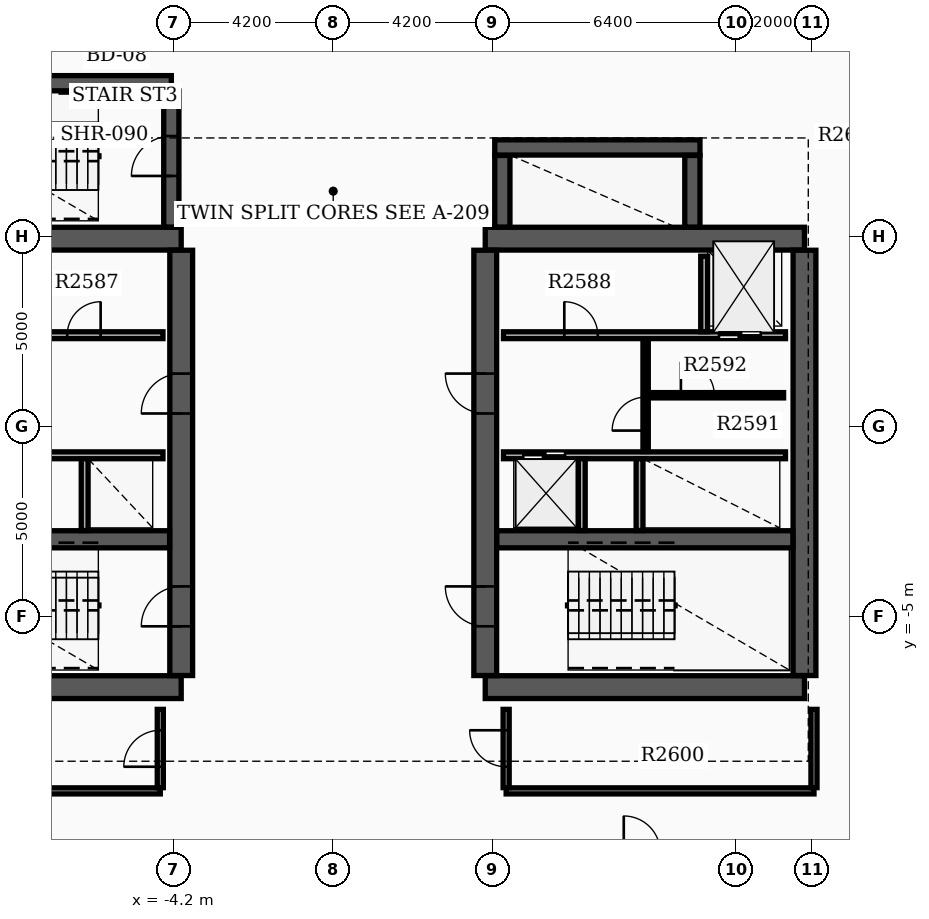
"""IFC4 building model, lengths in metres.
Left out: names, types, materials, properties, quantities, classifications, styles, units other than length and angle.
Written with IfcOpenShell. Run it as: python <this file> out.ifc"""

import sys

from ifc_helpers import new_model, si_unit, direction, frame, frame_2d, origin, place, context, subcontext, project, spatial, rectangle, extrude, element, fill, save


model = new_model("IFC4")
c1 = context("Model", 3, precision=1e-05, world=origin(), true_north=direction((0.0, 1.0)))
c2 = subcontext(c1, "Body", "Model", "MODEL_VIEW")
j1 = project(units=[si_unit("LENGTHUNIT", "METRE"), si_unit("PLANEANGLEUNIT", "RADIAN")], contexts=[c1])
p1 = place(None, origin())
s1 = spatial("IfcSite", under=j1, at=p1, CompositionType="ELEMENT")
p2 = place(p1, origin())
s2 = spatial("IfcBuilding", under=s1, at=p2, CompositionType="ELEMENT")
p3 = place(p2, frame((0.0, 0.0, 164.4)))
s3 = spatial("IfcBuildingStorey", under=s2, at=p3, CompositionType="ELEMENT", Elevation=164.4)
for number, where, z_axis, x_axis in (
    (1, (-12.4, -6.85, 0.0), (0.0, 0.0, 1.0), (1.0, 0.0, 0.0)),
    (2, (-12.4, 4.95, 0.0), (0.0, 0.0, 1.0), (1.0, 0.0, 0.0)),
):
    element("IfcWall", number, at=place(p3, frame(where, z_axis=z_axis, x_axis=x_axis)), inside=s3, PredefinedType="SHEAR", context=c2, shape_type="SweptSolid", body=[
        extrude(rectangle(XDim=8.4, YDim=0.6, at=frame_2d((4.2, 0.0))), origin(), (0.0, 0.0, 1.0), 3.7),
    ])
p4 = place(p3, frame((-4.0, -6.545, 0.0), z_axis=(0.0, 0.0, 1.0), x_axis=(0.0, 1.0, 0.0)))
e3 = element("IfcWall", 3, at=p4, inside=s3, PredefinedType="SHEAR", context=c2, shape_type="SweptSolid", body=[
    extrude(rectangle(XDim=11.19, YDim=0.6, at=frame_2d((5.595, 0.0))), origin(), (0.0, 0.0, 1.0), 3.7),
])
p5 = place(p4, frame((1.295, 0.0, 0.0)))
e4 = element("IfcOpeningElement", 4, at=p5, cuts=e3, PredefinedType="OPENING", context=c2, shape_type="SweptSolid", body=[
    extrude(rectangle(XDim=1.05, YDim=2.15, at=frame_2d((0.525, 1.075))), frame((0.0, 0.31, 0.0), z_axis=(0.0, -1.0, 0.0), x_axis=(1.0, 0.0, 0.0)), (0.0, 0.0, 1.0), 0.62),
])
p6 = place(p4, frame((6.895, 0.0, 0.0)))
e5 = element("IfcOpeningElement", 5, at=p6, cuts=e3, PredefinedType="OPENING", context=c2, shape_type="SweptSolid", body=[
    extrude(rectangle(XDim=1.05, YDim=2.15, at=frame_2d((0.525, 1.075))), frame((0.0, 0.31, 0.0), z_axis=(0.0, -1.0, 0.0), x_axis=(1.0, 0.0, 0.0)), (0.0, 0.0, 1.0), 0.62),
])
p7 = place(p3, frame((-12.095, -2.96, 0.0), z_axis=(0.0, 0.0, 1.0), x_axis=(1.0, 0.0, 0.0)))
e6 = element("IfcWall", 6, at=p7, inside=s3, PredefinedType="SHEAR", context=c2, shape_type="SweptSolid", body=[
    extrude(rectangle(XDim=7.79, YDim=0.45, at=frame_2d((3.895, 0.0))), origin(), (0.0, 0.0, 1.0), 3.7),
])
for number, where, z_axis, x_axis in (
    (7, (4.0, -6.85, 0.0), (0.0, 0.0, 1.0), (1.0, 0.0, 0.0)),
    (8, (4.0, 4.95, 0.0), (0.0, 0.0, 1.0), (1.0, 0.0, 0.0)),
):
    element("IfcWall", number, at=place(p3, frame(where, z_axis=z_axis, x_axis=x_axis)), inside=s3, PredefinedType="SHEAR", context=c2, shape_type="SweptSolid", body=[
        extrude(rectangle(XDim=8.4, YDim=0.6, at=frame_2d((4.2, 0.0))), origin(), (0.0, 0.0, 1.0), 3.7),
    ])
p8 = place(p3, frame((4.0, -6.545, 0.0), z_axis=(0.0, 0.0, 1.0), x_axis=(0.0, 1.0, 0.0)))
e9 = element("IfcWall", 9, at=p8, inside=s3, PredefinedType="SHEAR", context=c2, shape_type="SweptSolid", body=[
    extrude(rectangle(XDim=11.19, YDim=0.6, at=frame_2d((5.595, 0.0))), origin(), (0.0, 0.0, 1.0), 3.7),
])
p9 = place(p8, frame((1.295, 0.0, 0.0)))
e10 = element("IfcOpeningElement", 10, at=p9, cuts=e9, PredefinedType="OPENING", context=c2, shape_type="SweptSolid", body=[
    extrude(rectangle(XDim=1.05, YDim=2.15, at=frame_2d((0.525, 1.075))), frame((0.0, 0.31, 0.0), z_axis=(0.0, -1.0, 0.0), x_axis=(1.0, 0.0, 0.0)), (0.0, 0.0, 1.0), 0.62),
])
p10 = place(p8, frame((6.895, 0.0, 0.0)))
e11 = element("IfcOpeningElement", 11, at=p10, cuts=e9, PredefinedType="OPENING", context=c2, shape_type="SweptSolid", body=[
    extrude(rectangle(XDim=1.05, YDim=2.15, at=frame_2d((0.525, 1.075))), frame((0.0, 0.31, 0.0), z_axis=(0.0, -1.0, 0.0), x_axis=(1.0, 0.0, 0.0)), (0.0, 0.0, 1.0), 0.62),
])
p11 = place(p3, frame((12.4, -6.545, 0.0), z_axis=(0.0, 0.0, 1.0), x_axis=(0.0, 1.0, 0.0)))
e12 = element("IfcWall", 12, at=p11, inside=s3, PredefinedType="SHEAR", context=c2, shape_type="SweptSolid", body=[
    extrude(rectangle(XDim=11.19, YDim=0.6, at=frame_2d((5.595, 0.0))), origin(), (0.0, 0.0, 1.0), 3.7),
])
p12 = place(p3, frame((4.305, -2.96, 0.0), z_axis=(0.0, 0.0, 1.0), x_axis=(1.0, 0.0, 0.0)))
e13 = element("IfcWall", 13, at=p12, inside=s3, PredefinedType="SHEAR", context=c2, shape_type="SweptSolid", body=[
    extrude(rectangle(XDim=7.79, YDim=0.45, at=frame_2d((3.895, 0.0))), origin(), (0.0, 0.0, 1.0), 3.7),
])
p13 = place(p3, frame((-12.22, 9.04, 0.0), z_axis=(0.0, 0.0, 1.0), x_axis=(1.0, 0.0, 0.0)))
e14 = element("IfcWall", 14, at=p13, inside=s3, PredefinedType="SHEAR", context=c2, shape_type="SweptSolid", body=[
    extrude(rectangle(XDim=7.96, YDim=0.4, at=frame_2d((3.98, 0.0))), origin(), (0.0, 0.0, 1.0), 3.7),
])
p14 = place(p3, frame((-4.26, 5.255, 0.0), z_axis=(0.0, 0.0, 1.0), x_axis=(0.0, 1.0, 0.0)))
e15 = element("IfcWall", 15, at=p14, inside=s3, PredefinedType="SHEAR", context=c2, shape_type="SweptSolid", body=[
    extrude(rectangle(XDim=3.58, YDim=0.4, at=frame_2d((1.79, 0.0))), origin(), (0.0, 0.0, 1.0), 3.7),
])
p15 = place(p14, frame((1.345, 0.0, 0.0)))
e16 = element("IfcOpeningElement", 16, at=p15, cuts=e15, PredefinedType="OPENING", context=c2, shape_type="SweptSolid", body=[
    extrude(rectangle(XDim=1.05, YDim=2.15, at=frame_2d((0.525, 1.075))), frame((0.0, 0.21, 0.0), z_axis=(0.0, -1.0, 0.0), x_axis=(1.0, 0.0, 0.0)), (0.0, 0.0, 1.0), 0.42),
])
p16 = place(p3, frame((4.45, 5.255, 0.0), z_axis=(0.0, 0.0, 1.0), x_axis=(0.0, 1.0, 0.0)))
e17 = element("IfcWall", 17, at=p16, inside=s3, PredefinedType="SHEAR", context=c2, shape_type="SweptSolid", body=[
    extrude(rectangle(XDim=1.885, YDim=0.4, at=frame_2d((0.942, 0.0))), origin(), (0.0, 0.0, 1.0), 3.7),
])
p17 = place(p3, frame((4.25, 7.35, 0.0), z_axis=(0.0, 0.0, 1.0), x_axis=(1.0, 0.0, 0.0)))
e18 = element("IfcWall", 18, at=p17, inside=s3, PredefinedType="SHEAR", context=c2, shape_type="SweptSolid", body=[
    extrude(rectangle(XDim=5.4, YDim=0.4, at=frame_2d((2.7, 0.0))), origin(), (0.0, 0.0, 1.0), 3.7),
])
p18 = place(p3, frame((9.45, 5.255, 0.0), z_axis=(0.0, 0.0, 1.0), x_axis=(0.0, 1.0, 0.0)))
e19 = element("IfcWall", 19, at=p18, inside=s3, PredefinedType="SHEAR", context=c2, shape_type="SweptSolid", body=[
    extrude(rectangle(XDim=1.885, YDim=0.4, at=frame_2d((0.942, 0.0))), origin(), (0.0, 0.0, 1.0), 3.7),
])
p19 = place(p3, frame((14.238, -7.721, 0.0), z_axis=(0.0, 0.0, 1.0), x_axis=(-0.078438149236, -0.996918982036, 0.0)))
e20 = element("IfcWall", 20, at=p19, inside=s3, PredefinedType="STANDARD", context=c2, shape_type="SweptSolid", body=[
    extrude(rectangle(XDim=6.86, YDim=0.28, at=frame_2d((3.43, 0.0))), origin(), (0.0, 0.0, 1.0), 2.97),
])
p20 = place(p3, frame((-11.9, 2.41, 0.0), z_axis=(0.0, 0.0, 1.0), x_axis=(1.0, 0.0, 0.0)))
e21 = element("IfcWall", 21, at=p20, inside=s3, PredefinedType="SOLIDWALL", context=c2, shape_type="SweptSolid", body=[
    extrude(rectangle(XDim=7.42, YDim=0.18, at=frame_2d((3.71, 0.0))), origin(), (0.0, 0.0, 1.0), 2.96),
])
p21 = place(p20, frame((0.55, 0.0, 0.0)))
e22 = element("IfcOpeningElement", 22, at=p21, cuts=e21, PredefinedType="OPENING", context=c2, shape_type="SweptSolid", body=[
    extrude(rectangle(XDim=1.1, YDim=2.15, at=frame_2d((0.55, 1.075))), frame((0.0, 0.1, 0.0), z_axis=(0.0, -1.0, 0.0), x_axis=(1.0, 0.0, 0.0)), (0.0, 0.0, 1.0), 0.2),
])
p22 = place(p20, frame((4.9, 0.0, 0.0)))
e23 = element("IfcOpeningElement", 23, at=p22, cuts=e21, PredefinedType="OPENING", context=c2, shape_type="SweptSolid", body=[
    extrude(rectangle(XDim=0.88, YDim=2.1, at=frame_2d((0.44, 1.05))), frame((0.0, 0.1, 0.0), z_axis=(0.0, -1.0, 0.0), x_axis=(1.0, 0.0, 0.0)), (0.0, 0.0, 1.0), 0.2),
])
p23 = place(p3, frame((4.48, 2.41, 0.0), z_axis=(0.0, 0.0, 1.0), x_axis=(1.0, 0.0, 0.0)))
e24 = element("IfcWall", 24, at=p23, inside=s3, PredefinedType="SOLIDWALL", context=c2, shape_type="SweptSolid", body=[
    extrude(rectangle(XDim=7.42, YDim=0.18, at=frame_2d((3.71, 0.0))), origin(), (0.0, 0.0, 1.0), 2.96),
])
p24 = place(p23, frame((5.67, 0.0, 0.0)))
e25 = element("IfcOpeningElement", 25, at=p24, cuts=e24, PredefinedType="OPENING", context=c2, shape_type="SweptSolid", body=[
    extrude(rectangle(XDim=1.1, YDim=2.15, at=frame_2d((0.55, 1.075))), frame((0.0, 0.1, 0.0), z_axis=(0.0, -1.0, 0.0), x_axis=(1.0, 0.0, 0.0)), (0.0, 0.0, 1.0), 0.2),
])
p25 = place(p23, frame((1.6, 0.0, 0.0)))
e26 = element("IfcOpeningElement", 26, at=p25, cuts=e24, PredefinedType="OPENING", context=c2, shape_type="SweptSolid", body=[
    extrude(rectangle(XDim=0.88, YDim=2.1, at=frame_2d((0.44, 1.05))), frame((0.0, 0.1, 0.0), z_axis=(0.0, -1.0, 0.0), x_axis=(1.0, 0.0, 0.0)), (0.0, 0.0, 1.0), 0.2),
])
p26 = place(p3, frame((-11.9, -0.75, 0.0), z_axis=(0.0, 0.0, 1.0), x_axis=(1.0, 0.0, 0.0)))
e27 = element("IfcWall", 27, at=p26, inside=s3, PredefinedType="SOLIDWALL", context=c2, shape_type="SweptSolid", body=[
    extrude(rectangle(XDim=7.42, YDim=0.18, at=frame_2d((3.71, 0.0))), origin(), (0.0, 0.0, 1.0), 2.96),
])
p27 = place(p26, frame((0.45, 0.0, 0.0)))
e28 = element("IfcOpeningElement", 28, at=p27, cuts=e27, PredefinedType="OPENING", context=c2, shape_type="SweptSolid", body=[
    extrude(rectangle(XDim=1.1, YDim=2.15, at=frame_2d((0.55, 1.075))), frame((0.0, 0.1, 0.0), z_axis=(0.0, -1.0, 0.0), x_axis=(1.0, 0.0, 0.0)), (0.0, 0.0, 1.0), 0.2),
])
p28 = place(p26, frame((2.35, 0.0, 0.0)))
e29 = element("IfcOpeningElement", 29, at=p28, cuts=e27, PredefinedType="OPENING", context=c2, shape_type="SweptSolid", body=[
    extrude(rectangle(XDim=1.1, YDim=2.15, at=frame_2d((0.55, 1.075))), frame((0.0, 0.1, 0.0), z_axis=(0.0, -1.0, 0.0), x_axis=(1.0, 0.0, 0.0)), (0.0, 0.0, 1.0), 0.2),
])
p29 = place(p3, frame((4.48, -0.75, 0.0), z_axis=(0.0, 0.0, 1.0), x_axis=(1.0, 0.0, 0.0)))
e30 = element("IfcWall", 30, at=p29, inside=s3, PredefinedType="SOLIDWALL", context=c2, shape_type="SweptSolid", body=[
    extrude(rectangle(XDim=7.42, YDim=0.18, at=frame_2d((3.71, 0.0))), origin(), (0.0, 0.0, 1.0), 2.96),
])
p30 = place(p29, frame((0.52, 0.0, 0.0)))
e31 = element("IfcOpeningElement", 31, at=p30, cuts=e30, PredefinedType="OPENING", context=c2, shape_type="SweptSolid", body=[
    extrude(rectangle(XDim=1.1, YDim=2.15, at=frame_2d((0.55, 1.075))), frame((0.0, 0.1, 0.0), z_axis=(0.0, -1.0, 0.0), x_axis=(1.0, 0.0, 0.0)), (0.0, 0.0, 1.0), 0.2),
])
p31 = place(p3, frame((9.76, 2.5, 0.0), z_axis=(0.0, 0.0, 1.0), x_axis=(0.0, 1.0, 0.0)))
e32 = element("IfcWall", 32, at=p31, inside=s3, PredefinedType="SOLIDWALL", context=c2, shape_type="SweptSolid", body=[
    extrude(rectangle(XDim=1.99, YDim=0.18, at=frame_2d((0.995, 0.0))), origin(), (0.0, 0.0, 1.0), 2.96),
])
for number, where, z_axis, x_axis in (
    (33, (-6.54, -2.73, 0.0), (0.0, 0.0, 1.0), (0.0, 1.0, 0.0)),
    (34, (6.54, -2.73, 0.0), (0.0, 0.0, 1.0), (0.0, 1.0, 0.0)),
    (35, (8.06, -2.73, 0.0), (0.0, 0.0, 1.0), (0.0, 1.0, 0.0)),
):
    element("IfcWall", number, at=place(p3, frame(where, z_axis=z_axis, x_axis=x_axis)), inside=s3, PredefinedType="SOLIDWALL", context=c2, shape_type="SweptSolid", body=[
        extrude(rectangle(XDim=1.89, YDim=0.18, at=frame_2d((0.945, 0.0))), origin(), (0.0, 0.0, 1.0), 2.96),
    ])
p32 = place(p3, frame((8.22, -0.65, 0.0), z_axis=(0.0, 0.0, 1.0), x_axis=(0.0, 1.0, 0.0)))
e36 = element("IfcWall", 36, at=p32, inside=s3, PredefinedType="SOLIDWALL", context=c2, shape_type="SweptSolid", body=[
    extrude(rectangle(XDim=2.96, YDim=0.14, at=frame_2d((1.48, 0.0))), origin(), (0.0, 0.0, 1.0), 2.96),
])
p33 = place(p32, frame((0.55, 0.0, 0.0)))
e37 = element("IfcOpeningElement", 37, at=p33, cuts=e36, PredefinedType="OPENING", context=c2, shape_type="SweptSolid", body=[
    extrude(rectangle(XDim=0.88, YDim=2.1, at=frame_2d((0.44, 1.05))), frame((0.0, 0.08, 0.0), z_axis=(0.0, -1.0, 0.0), x_axis=(1.0, 0.0, 0.0)), (0.0, 0.0, 1.0), 0.16),
])
p34 = place(p3, frame((8.298, 0.83, 0.0), z_axis=(0.0, 0.0, 1.0), x_axis=(1.0, 0.0, 0.0)))
e38 = element("IfcWall", 38, at=p34, inside=s3, PredefinedType="PARTITIONING", context=c2, shape_type="SweptSolid", body=[
    extrude(rectangle(XDim=3.552, YDim=0.14, at=frame_2d((1.776, 0.0))), origin(), (0.0, 0.0, 1.0), 2.96),
])
p35 = place(p34, frame((0.85, 0.0, 0.0)))
e39 = element("IfcOpeningElement", 39, at=p35, cuts=e38, PredefinedType="OPENING", context=c2, shape_type="SweptSolid", body=[
    extrude(rectangle(XDim=0.88, YDim=2.1, at=frame_2d((0.44, 1.05))), frame((0.0, 0.08, 0.0), z_axis=(0.0, -1.0, 0.0), x_axis=(1.0, 0.0, 0.0)), (0.0, 0.0, 1.0), 0.16),
])
p36 = place(p3, frame((4.55, -9.58, 0.0), z_axis=(0.0, 0.0, 1.0), x_axis=(1.0, 0.0, 0.0)))
e40 = element("IfcWall", 40, at=p36, inside=s3, PredefinedType="PARTITIONING", context=c2, shape_type="SweptSolid", body=[
    extrude(rectangle(XDim=8.1, YDim=0.16, at=frame_2d((4.05, 0.0))), origin(), (0.0, 0.0, 1.0), 2.96),
])
p37 = place(p3, frame((4.55, -9.495, 0.0), z_axis=(0.0, 0.0, 1.0), x_axis=(0.0, 1.0, 0.0)))
e41 = element("IfcWall", 41, at=p37, inside=s3, PredefinedType="PARTITIONING", context=c2, shape_type="SweptSolid", body=[
    extrude(rectangle(XDim=2.06, YDim=0.16, at=frame_2d((1.03, 0.0))), origin(), (0.0, 0.0, 1.0), 2.96),
])
p38 = place(p37, frame((0.55, 0.0, 0.0)))
e42 = element("IfcOpeningElement", 42, at=p38, cuts=e41, PredefinedType="OPENING", context=c2, shape_type="SweptSolid", body=[
    extrude(rectangle(XDim=0.96, YDim=2.15, at=frame_2d((0.48, 1.075))), frame((0.0, 0.09, 0.0), z_axis=(0.0, -1.0, 0.0), x_axis=(1.0, 0.0, 0.0)), (0.0, 0.0, 1.0), 0.18),
])
p39 = place(p3, frame((12.65, -9.495, 0.0), z_axis=(0.0, 0.0, 1.0), x_axis=(0.0, 1.0, 0.0)))
e43 = element("IfcWall", 43, at=p39, inside=s3, PredefinedType="PARTITIONING", context=c2, shape_type="SweptSolid", body=[
    extrude(rectangle(XDim=2.06, YDim=0.16, at=frame_2d((1.03, 0.0))), origin(), (0.0, 0.0, 1.0), 2.96),
])
p40 = place(p3, frame((-12.65, -9.58, 0.0), z_axis=(0.0, 0.0, 1.0), x_axis=(1.0, 0.0, 0.0)))
e44 = element("IfcWall", 44, at=p40, inside=s3, PredefinedType="PARTITIONING", context=c2, shape_type="SweptSolid", body=[
    extrude(rectangle(XDim=8.1, YDim=0.16, at=frame_2d((4.05, 0.0))), origin(), (0.0, 0.0, 1.0), 2.96),
])
p41 = place(p3, frame((-4.55, -9.495, 0.0), z_axis=(0.0, 0.0, 1.0), x_axis=(0.0, 1.0, 0.0)))
e45 = element("IfcWall", 45, at=p41, inside=s3, PredefinedType="PARTITIONING", context=c2, shape_type="SweptSolid", body=[
    extrude(rectangle(XDim=2.06, YDim=0.16, at=frame_2d((1.03, 0.0))), origin(), (0.0, 0.0, 1.0), 2.96),
])
p42 = place(p41, frame((0.55, 0.0, 0.0)))
e46 = element("IfcOpeningElement", 46, at=p42, cuts=e45, PredefinedType="OPENING", context=c2, shape_type="SweptSolid", body=[
    extrude(rectangle(XDim=0.96, YDim=2.15, at=frame_2d((0.48, 1.075))), frame((0.0, 0.09, 0.0), z_axis=(0.0, -1.0, 0.0), x_axis=(1.0, 0.0, 0.0)), (0.0, 0.0, 1.0), 0.18),
])
p43 = place(p5, origin())
e47 = element("IfcDoor", 47, at=p43, inside=s3, OperationType="SINGLE_SWING_LEFT", PredefinedType="DOOR", context=c2, shape_type="SweptSolid", body=[
    extrude(rectangle(XDim=1.05, YDim=2.15, at=frame_2d((0.525, 1.075))), frame((0.0, 0.025, 0.0), z_axis=(0.0, -1.0, 0.0), x_axis=(1.0, 0.0, 0.0)), (0.0, 0.0, 1.0), 0.05),
])
fill(e4, e47)
p44 = place(p9, origin())
e48 = element("IfcDoor", 48, at=p44, inside=s3, OperationType="SINGLE_SWING_RIGHT", PredefinedType="DOOR", context=c2, shape_type="SweptSolid", body=[
    extrude(rectangle(XDim=1.05, YDim=2.15, at=frame_2d((0.525, 1.075))), frame((0.0, 0.025, 0.0), z_axis=(0.0, -1.0, 0.0), x_axis=(1.0, 0.0, 0.0)), (0.0, 0.0, 1.0), 0.05),
])
fill(e10, e48)
p45 = place(p6, origin())
e49 = element("IfcDoor", 49, at=p45, inside=s3, OperationType="SINGLE_SWING_LEFT", PredefinedType="DOOR", context=c2, shape_type="SweptSolid", body=[
    extrude(rectangle(XDim=1.05, YDim=2.15, at=frame_2d((0.525, 1.075))), frame((0.0, 0.025, 0.0), z_axis=(0.0, -1.0, 0.0), x_axis=(1.0, 0.0, 0.0)), (0.0, 0.0, 1.0), 0.05),
])
fill(e5, e49)
p46 = place(p10, origin())
e50 = element("IfcDoor", 50, at=p46, inside=s3, OperationType="SINGLE_SWING_RIGHT", PredefinedType="DOOR", context=c2, shape_type="SweptSolid", body=[
    extrude(rectangle(XDim=1.05, YDim=2.15, at=frame_2d((0.525, 1.075))), frame((0.0, 0.025, 0.0), z_axis=(0.0, -1.0, 0.0), x_axis=(1.0, 0.0, 0.0)), (0.0, 0.0, 1.0), 0.05),
])
fill(e11, e50)
p47 = place(p15, origin())
e51 = element("IfcDoor", 51, at=p47, inside=s3, OperationType="SINGLE_SWING_LEFT", PredefinedType="DOOR", context=c2, shape_type="SweptSolid", body=[
    extrude(rectangle(XDim=1.05, YDim=2.15, at=frame_2d((0.525, 1.075))), frame((0.0, 0.025, 0.0), z_axis=(0.0, -1.0, 0.0), x_axis=(1.0, 0.0, 0.0)), (0.0, 0.0, 1.0), 0.05),
])
fill(e16, e51)
p48 = place(p24, origin())
e52 = element("IfcDoor", 52, at=p48, inside=s3, OperationType="DOUBLE_DOOR_SLIDING", PredefinedType="DOOR", context=c2, shape_type="SweptSolid", body=[
    extrude(rectangle(XDim=1.1, YDim=2.15, at=frame_2d((0.55, 1.075))), frame((0.0, 0.025, 0.0), z_axis=(0.0, -1.0, 0.0), x_axis=(1.0, 0.0, 0.0)), (0.0, 0.0, 1.0), 0.05),
])
fill(e25, e52)
p49 = place(p30, origin())
e53 = element("IfcDoor", 53, at=p49, inside=s3, OperationType="DOUBLE_DOOR_SLIDING", PredefinedType="DOOR", context=c2, shape_type="SweptSolid", body=[
    extrude(rectangle(XDim=1.1, YDim=2.15, at=frame_2d((0.55, 1.075))), frame((0.0, 0.025, 0.0), z_axis=(0.0, -1.0, 0.0), x_axis=(1.0, 0.0, 0.0)), (0.0, 0.0, 1.0), 0.05),
])
fill(e31, e53)
p50 = place(p22, origin())
e54 = element("IfcDoor", 54, at=p50, inside=s3, OperationType="SINGLE_SWING_RIGHT", PredefinedType="DOOR", context=c2, shape_type="SweptSolid", body=[
    extrude(rectangle(XDim=0.88, YDim=2.1, at=frame_2d((0.44, 1.05))), frame((0.0, 0.025, 0.0), z_axis=(0.0, -1.0, 0.0), x_axis=(1.0, 0.0, 0.0)), (0.0, 0.0, 1.0), 0.05),
])
fill(e23, e54)
p51 = place(p25, origin())
e55 = element("IfcDoor", 55, at=p51, inside=s3, OperationType="SINGLE_SWING_LEFT", PredefinedType="DOOR", context=c2, shape_type="SweptSolid", body=[
    extrude(rectangle(XDim=0.88, YDim=2.1, at=frame_2d((0.44, 1.05))), frame((0.0, 0.025, 0.0), z_axis=(0.0, -1.0, 0.0), x_axis=(1.0, 0.0, 0.0)), (0.0, 0.0, 1.0), 0.05),
])
fill(e26, e55)
p52 = place(p33, origin())
e56 = element("IfcDoor", 56, at=p52, inside=s3, OperationType="SINGLE_SWING_LEFT", PredefinedType="DOOR", context=c2, shape_type="SweptSolid", body=[
    extrude(rectangle(XDim=0.88, YDim=2.1, at=frame_2d((0.44, 1.05))), frame((0.0, 0.025, 0.0), z_axis=(0.0, -1.0, 0.0), x_axis=(1.0, 0.0, 0.0)), (0.0, 0.0, 1.0), 0.05),
])
fill(e37, e56)
p53 = place(p35, origin())
e57 = element("IfcDoor", 57, at=p53, inside=s3, OperationType="SINGLE_SWING_LEFT", PredefinedType="DOOR", context=c2, shape_type="SweptSolid", body=[
    extrude(rectangle(XDim=0.88, YDim=2.1, at=frame_2d((0.44, 1.05))), frame((0.0, 0.025, 0.0), z_axis=(0.0, -1.0, 0.0), x_axis=(1.0, 0.0, 0.0)), (0.0, 0.0, 1.0), 0.05),
])
fill(e39, e57)
p54 = place(p38, origin())
e58 = element("IfcDoor", 58, at=p54, inside=s3, OperationType="SINGLE_SWING_RIGHT", PredefinedType="DOOR", context=c2, shape_type="SweptSolid", body=[
    extrude(rectangle(XDim=0.96, YDim=2.15, at=frame_2d((0.48, 1.075))), frame((0.0, 0.025, 0.0), z_axis=(0.0, -1.0, 0.0), x_axis=(1.0, 0.0, 0.0)), (0.0, 0.0, 1.0), 0.05),
])
fill(e42, e58)
p55 = place(p42, origin())
e59 = element("IfcDoor", 59, at=p55, inside=s3, OperationType="SINGLE_SWING_LEFT", PredefinedType="DOOR", context=c2, shape_type="SweptSolid", body=[
    extrude(rectangle(XDim=0.96, YDim=2.15, at=frame_2d((0.48, 1.075))), frame((0.0, 0.025, 0.0), z_axis=(0.0, -1.0, 0.0), x_axis=(1.0, 0.0, 0.0)), (0.0, 0.0, 1.0), 0.05),
])
fill(e46, e59)
save(model, sys.argv[1])
